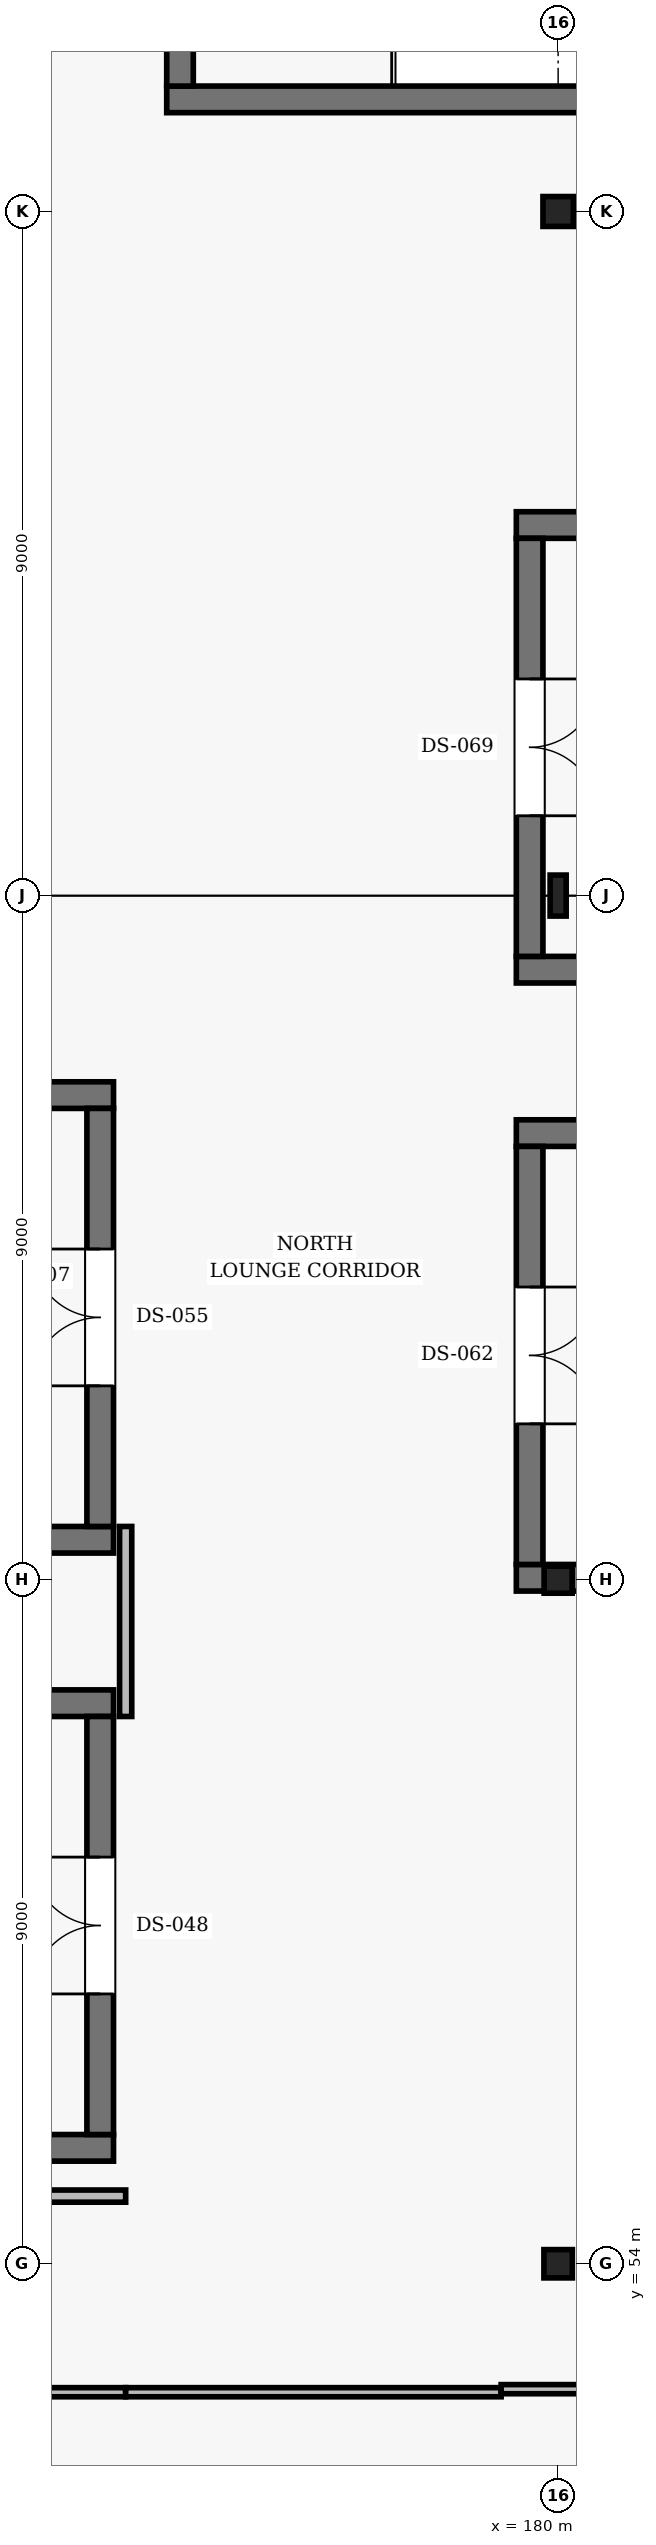
"""IFC4 building model, lengths in metres.
Left out: names, types, materials, properties, quantities, classifications, styles, units other than length and angle.
Written with IfcOpenShell. Run it as: python <this file> out.ifc"""

import sys

from ifc_helpers import new_model, si_unit, direction, frame, frame_2d, origin, origin_2d, place, context, subcontext, project, spatial, rectangle, i_section, extrude, element, fill, save


model = new_model("IFC4")
c1 = context("Model", 3, precision=1e-05, world=origin(), true_north=direction((0.0, 1.0)))
c2 = subcontext(c1, "Body", "Model", "MODEL_VIEW")
j1 = project(units=[si_unit("LENGTHUNIT", "METRE"), si_unit("PLANEANGLEUNIT", "RADIAN")], contexts=[c1])
p1 = place(None, origin())
s1 = spatial("IfcSite", under=j1, at=p1, CompositionType="ELEMENT")
p2 = place(p1, origin())
s2 = spatial("IfcBuilding", under=s1, at=p2, CompositionType="ELEMENT")
p3 = place(p2, frame((0.0, 0.0, 20.4)))
s3 = spatial("IfcBuildingStorey", under=s2, at=p3, CompositionType="ELEMENT", Elevation=20.4)
p4 = place(p3, frame((180.0, 54.0, 0.0), z_axis=(0.0, 0.0, 1.0), x_axis=(1.0, 0.0, 0.0)))
e1 = element("IfcColumn", 1, at=p4, inside=s3, PredefinedType="COLUMN", context=c2, shape_type="SweptSolid", body=[
    extrude(i_section(OverallWidth=0.374, OverallDepth=0.372, WebThickness=0.016, FlangeThickness=0.026, FilletRadius=0.016, at=origin_2d()), origin(), (0.0, 0.0, 1.0), 4.8),
])
p5 = place(p3, frame((180.0, 63.0, 0.0), z_axis=(0.0, 0.0, 1.0), x_axis=(1.0, 0.0, 0.0)))
e2 = element("IfcColumn", 2, at=p5, inside=s3, PredefinedType="COLUMN", context=c2, shape_type="SweptSolid", body=[
    extrude(i_section(OverallWidth=0.369, OverallDepth=0.356, WebThickness=0.011, FlangeThickness=0.018, FilletRadius=0.015, at=origin_2d()), origin(), (0.0, 0.0, 1.0), 4.8),
])
p6 = place(p3, frame((180.0, 72.0, 0.0), z_axis=(0.0, 0.0, 1.0), x_axis=(1.0, 0.0, 0.0)))
e3 = element("IfcColumn", 3, at=p6, inside=s3, PredefinedType="COLUMN", context=c2, shape_type="SweptSolid", body=[
    extrude(i_section(OverallWidth=0.211, OverallDepth=0.539, WebThickness=0.012, FlangeThickness=0.019, FilletRadius=0.014, at=origin_2d()), origin(), (0.0, 0.0, 1.0), 4.8),
])
p7 = place(p3, frame((180.0, 81.0, 0.0), z_axis=(0.0, 0.0, 1.0), x_axis=(1.0, 0.0, 0.0)))
e4 = element("IfcColumn", 4, at=p7, inside=s3, PredefinedType="COLUMN", context=c2, shape_type="SweptSolid", body=[
    extrude(i_section(OverallWidth=0.399, OverallDepth=0.393, WebThickness=0.023, FlangeThickness=0.037, FilletRadius=0.018, at=origin_2d()), origin(), (0.0, 0.0, 1.0), 4.8),
])
for number, where, z_axis, x_axis in (
    (5, (162.05, 55.525, 0.0), (0.0, 0.0, 1.0), (1.0, 0.0, 0.0)),
    (6, (174.15, 61.375, 0.0), (0.0, 0.0, 1.0), (-1.0, 0.0, 0.0)),
):
    element("IfcWall", number, at=place(p3, frame(where, z_axis=z_axis, x_axis=x_axis)), inside=s3, PredefinedType="SHEAR", context=c2, shape_type="SweptSolid", body=[
        extrude(rectangle(XDim=12.1, YDim=0.35, at=frame_2d((6.05, 0.0))), origin(), (0.0, 0.0, 1.0), 4.56),
    ])
p8 = place(p3, frame((173.975, 55.7, 0.0), z_axis=(0.0, 0.0, 1.0), x_axis=(0.0, 1.0, 0.0)))
e7 = element("IfcWall", 7, at=p8, inside=s3, PredefinedType="SHEAR", context=c2, shape_type="SweptSolid", body=[
    extrude(rectangle(XDim=5.5, YDim=0.35, at=frame_2d((2.75, 0.0))), origin(), (0.0, 0.0, 1.0), 4.56),
])
p9 = place(p8, frame((1.85, 0.0, 0.0)))
e8 = element("IfcOpeningElement", 8, at=p9, cuts=e7, PredefinedType="OPENING", context=c2, shape_type="SweptSolid", body=[
    extrude(rectangle(XDim=1.8, YDim=2.2, at=frame_2d((0.9, 1.1))), frame((0.0, 0.185, 0.0), z_axis=(0.0, -1.0, 0.0), x_axis=(1.0, 0.0, 0.0)), (0.0, 0.0, 1.0), 0.37),
])
for number, where, z_axis, x_axis in (
    (9, (162.05, 63.525, 0.0), (0.0, 0.0, 1.0), (1.0, 0.0, 0.0)),
    (10, (174.15, 69.375, 0.0), (0.0, 0.0, 1.0), (-1.0, 0.0, 0.0)),
):
    element("IfcWall", number, at=place(p3, frame(where, z_axis=z_axis, x_axis=x_axis)), inside=s3, PredefinedType="SHEAR", context=c2, shape_type="SweptSolid", body=[
        extrude(rectangle(XDim=12.1, YDim=0.35, at=frame_2d((6.05, 0.0))), origin(), (0.0, 0.0, 1.0), 4.56),
    ])
p10 = place(p3, frame((173.975, 63.7, 0.0), z_axis=(0.0, 0.0, 1.0), x_axis=(0.0, 1.0, 0.0)))
e11 = element("IfcWall", 11, at=p10, inside=s3, PredefinedType="SHEAR", context=c2, shape_type="SweptSolid", body=[
    extrude(rectangle(XDim=5.5, YDim=0.35, at=frame_2d((2.75, 0.0))), origin(), (0.0, 0.0, 1.0), 4.56),
])
p11 = place(p10, frame((1.85, 0.0, 0.0)))
e12 = element("IfcOpeningElement", 12, at=p11, cuts=e11, PredefinedType="OPENING", context=c2, shape_type="SweptSolid", body=[
    extrude(rectangle(XDim=1.8, YDim=2.2, at=frame_2d((0.9, 1.1))), frame((0.0, 0.185, 0.0), z_axis=(0.0, -1.0, 0.0), x_axis=(1.0, 0.0, 0.0)), (0.0, 0.0, 1.0), 0.37),
])
p12 = place(p3, frame((179.45, 63.025, 0.0), z_axis=(0.0, 0.0, 1.0), x_axis=(1.0, 0.0, 0.0)))
e13 = element("IfcWall", 13, at=p12, inside=s3, PredefinedType="SHEAR", context=c2, shape_type="SweptSolid", body=[
    extrude(rectangle(XDim=12.373, YDim=0.35, at=frame_2d((6.186, 0.0))), origin(), (0.0, 0.0, 1.0), 4.56),
])
p13 = place(p3, frame((191.55, 68.875, 0.0), z_axis=(0.0, 0.0, 1.0), x_axis=(-1.0, 0.0, 0.0)))
e14 = element("IfcWall", 14, at=p13, inside=s3, PredefinedType="SHEAR", context=c2, shape_type="SweptSolid", body=[
    extrude(rectangle(XDim=12.1, YDim=0.35, at=frame_2d((6.05, 0.0))), origin(), (0.0, 0.0, 1.0), 4.56),
])
p14 = place(p3, frame((179.625, 68.7, 0.0), z_axis=(0.0, 0.0, 1.0), x_axis=(0.0, -1.0, 0.0)))
e15 = element("IfcWall", 15, at=p14, inside=s3, PredefinedType="SHEAR", context=c2, shape_type="SweptSolid", body=[
    extrude(rectangle(XDim=5.5, YDim=0.35, at=frame_2d((2.75, 0.0))), origin(), (0.0, 0.0, 1.0), 4.56),
])
p15 = place(p14, frame((1.85, 0.0, 0.0)))
e16 = element("IfcOpeningElement", 16, at=p15, cuts=e15, PredefinedType="OPENING", context=c2, shape_type="SweptSolid", body=[
    extrude(rectangle(XDim=1.8, YDim=2.2, at=frame_2d((0.9, 1.1))), frame((0.0, 0.185, 0.0), z_axis=(0.0, -1.0, 0.0), x_axis=(1.0, 0.0, 0.0)), (0.0, 0.0, 1.0), 0.37),
])
for number, where, z_axis, x_axis in (
    (17, (179.45, 71.025, 0.0), (0.0, 0.0, 1.0), (1.0, 0.0, 0.0)),
    (18, (191.55, 76.875, 0.0), (0.0, 0.0, 1.0), (-1.0, 0.0, 0.0)),
):
    element("IfcWall", number, at=place(p3, frame(where, z_axis=z_axis, x_axis=x_axis)), inside=s3, PredefinedType="SHEAR", context=c2, shape_type="SweptSolid", body=[
        extrude(rectangle(XDim=12.1, YDim=0.35, at=frame_2d((6.05, 0.0))), origin(), (0.0, 0.0, 1.0), 4.56),
    ])
p16 = place(p3, frame((179.625, 76.7, 0.0), z_axis=(0.0, 0.0, 1.0), x_axis=(0.0, -1.0, 0.0)))
e19 = element("IfcWall", 19, at=p16, inside=s3, PredefinedType="SHEAR", context=c2, shape_type="SweptSolid", body=[
    extrude(rectangle(XDim=5.5, YDim=0.35, at=frame_2d((2.75, 0.0))), origin(), (0.0, 0.0, 1.0), 4.56),
])
p17 = place(p16, frame((1.85, 0.0, 0.0)))
e20 = element("IfcOpeningElement", 20, at=p17, cuts=e19, PredefinedType="OPENING", context=c2, shape_type="SweptSolid", body=[
    extrude(rectangle(XDim=1.8, YDim=2.2, at=frame_2d((0.9, 1.1))), frame((0.0, 0.185, 0.0), z_axis=(0.0, -1.0, 0.0), x_axis=(1.0, 0.0, 0.0)), (0.0, 0.0, 1.0), 0.37),
])
p18 = place(p3, frame((174.85, 82.475, 0.0), z_axis=(0.0, 0.0, 1.0), x_axis=(1.0, 0.0, 0.0)))
e21 = element("IfcWall", 21, at=p18, inside=s3, PredefinedType="SHEAR", context=c2, shape_type="SweptSolid", body=[
    extrude(rectangle(XDim=12.1, YDim=0.35, at=frame_2d((6.05, 0.0))), origin(), (0.0, 0.0, 1.0), 4.56),
])
p19 = place(p3, frame((175.025, 88.15, 0.0), z_axis=(0.0, 0.0, 1.0), x_axis=(0.0, -1.0, 0.0)))
e22 = element("IfcWall", 22, at=p19, inside=s3, PredefinedType="SHEAR", context=c2, shape_type="SweptSolid", body=[
    extrude(rectangle(XDim=5.5, YDim=0.35, at=frame_2d((2.75, 0.0))), origin(), (0.0, 0.0, 1.0), 4.56),
])
p20 = place(p19, frame((1.85, 0.0, 0.0)))
e23 = element("IfcOpeningElement", 23, at=p20, cuts=e22, PredefinedType="OPENING", context=c2, shape_type="SweptSolid", body=[
    extrude(rectangle(XDim=1.8, YDim=2.2, at=frame_2d((0.9, 1.1))), frame((0.0, 0.185, 0.0), z_axis=(0.0, -1.0, 0.0), x_axis=(1.0, 0.0, 0.0)), (0.0, 0.0, 1.0), 0.37),
])
p21 = place(p3, frame((174.31, 63.7, 0.0), z_axis=(0.0, 0.0, 1.0), x_axis=(0.0, -1.0, 0.0)))
e24 = element("IfcWall", 24, at=p21, inside=s3, PredefinedType="PARTITIONING", context=c2, shape_type="SweptSolid", body=[
    extrude(rectangle(XDim=2.5, YDim=0.16, at=frame_2d((1.25, 0.0))), origin(), (0.0, 0.0, 1.0), 3.85),
])
p22 = place(p3, frame((174.31, 54.89, 0.0), z_axis=(0.0, 0.0, 1.0), x_axis=(-1.0, 0.0, 0.0)))
e25 = element("IfcWall", 25, at=p22, inside=s3, PredefinedType="PARTITIONING", context=c2, shape_type="SweptSolid", body=[
    extrude(rectangle(XDim=14.96, YDim=0.16, at=frame_2d((7.48, 0.0))), origin(), (0.0, 0.0, 1.0), 3.861),
])
p23 = place(p3, frame((153.012, 52.31, 0.0), z_axis=(0.0, 0.0, 1.0), x_axis=(1.0, 0.0, 0.0)))
e26 = element("IfcWall", 26, at=p23, inside=s3, PredefinedType="PARTITIONING", context=c2, shape_type="SweptSolid", body=[
    extrude(rectangle(XDim=21.298, YDim=0.12, at=frame_2d((10.649, 0.0))), origin(), (0.0, 0.0, 1.0), 3.69),
])
p24 = place(p23, frame((10.169, 0.0, 0.0)))
e27 = element("IfcOpeningElement", 27, at=p24, cuts=e26, PredefinedType="OPENING", context=c2, shape_type="SweptSolid", body=[
    extrude(rectangle(XDim=0.96, YDim=2.15, at=frame_2d((0.48, 1.075))), frame((0.0, 0.07, 0.0), z_axis=(0.0, -1.0, 0.0), x_axis=(1.0, 0.0, 0.0)), (0.0, 0.0, 1.0), 0.14),
])
p25 = place(p3, frame((174.31, 52.31, 0.0), z_axis=(0.0, 0.0, 1.0), x_axis=(1.0, 0.0, 0.0)))
e28 = element("IfcWall", 28, at=p25, inside=s3, PredefinedType="PARTITIONING", context=c2, shape_type="SweptSolid", body=[
    extrude(rectangle(XDim=4.94, YDim=0.12, at=frame_2d((2.47, 0.0))), origin(), (0.0, 0.0, 1.0), 4.088),
])
p26 = place(p3, frame((179.25, 52.35, 0.0), z_axis=(0.0, 0.0, 1.0), x_axis=(1.0, 0.0, 0.0)))
e29 = element("IfcWall", 29, at=p26, inside=s3, PredefinedType="PARTITIONING", context=c2, shape_type="SweptSolid", body=[
    extrude(rectangle(XDim=12.738, YDim=0.12, at=frame_2d((6.369, 0.0))), origin(), (0.0, 0.0, 1.0), 3.69),
])
p27 = place(p9, origin())
e30 = element("IfcDoor", 30, at=p27, inside=s3, OperationType="DOUBLE_DOOR_SINGLE_SWING", PredefinedType="DOOR", context=c2, shape_type="SweptSolid", body=[
    extrude(rectangle(XDim=1.8, YDim=2.2, at=frame_2d((0.9, 1.1))), frame((0.0, 0.025, 0.0), z_axis=(0.0, -1.0, 0.0), x_axis=(1.0, 0.0, 0.0)), (0.0, 0.0, 1.0), 0.05),
])
fill(e8, e30)
p28 = place(p11, origin())
e31 = element("IfcDoor", 31, at=p28, inside=s3, OperationType="DOUBLE_DOOR_SINGLE_SWING", PredefinedType="DOOR", context=c2, shape_type="SweptSolid", body=[
    extrude(rectangle(XDim=1.8, YDim=2.2, at=frame_2d((0.9, 1.1))), frame((0.0, 0.025, 0.0), z_axis=(0.0, -1.0, 0.0), x_axis=(1.0, 0.0, 0.0)), (0.0, 0.0, 1.0), 0.05),
])
fill(e12, e31)
p29 = place(p15, origin())
e32 = element("IfcDoor", 32, at=p29, inside=s3, OperationType="DOUBLE_DOOR_SINGLE_SWING", PredefinedType="DOOR", context=c2, shape_type="SweptSolid", body=[
    extrude(rectangle(XDim=1.8, YDim=2.2, at=frame_2d((0.9, 1.1))), frame((0.0, 0.025, 0.0), z_axis=(0.0, -1.0, 0.0), x_axis=(1.0, 0.0, 0.0)), (0.0, 0.0, 1.0), 0.05),
])
fill(e16, e32)
p30 = place(p17, origin())
e33 = element("IfcDoor", 33, at=p30, inside=s3, OperationType="DOUBLE_DOOR_SINGLE_SWING", PredefinedType="DOOR", context=c2, shape_type="SweptSolid", body=[
    extrude(rectangle(XDim=1.8, YDim=2.2, at=frame_2d((0.9, 1.1))), frame((0.0, 0.025, 0.0), z_axis=(0.0, -1.0, 0.0), x_axis=(1.0, 0.0, 0.0)), (0.0, 0.0, 1.0), 0.05),
])
fill(e20, e33)
save(model, sys.argv[1])
